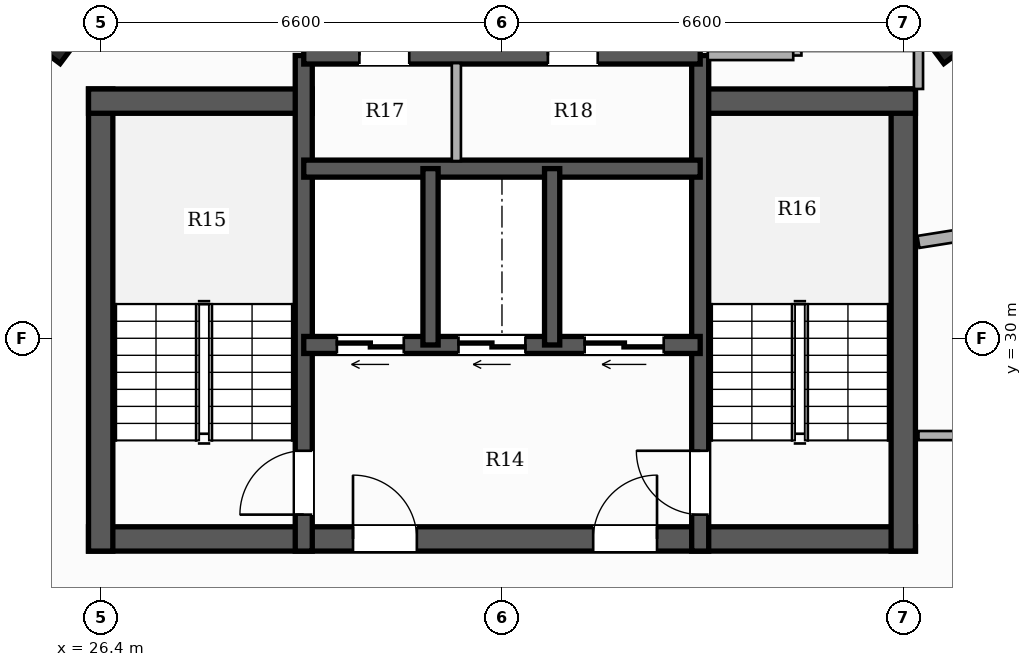
"""IFC4 building model, lengths in metres.
Left out: names, types, materials, properties, quantities, classifications, styles, units other than length and angle.
Written with IfcOpenShell. Run it as: python <this file> out.ifc"""

import sys

from ifc_helpers import new_model, si_unit, direction, frame, frame_2d, origin, origin_2d, place, context, subcontext, project, spatial, rectangle, hollow_rectangle, extrude, element, fill, save


model = new_model("IFC4")
c1 = context("Model", 3, precision=1e-05, world=origin(), true_north=direction((0.0, 1.0)))
c2 = subcontext(c1, "Body", "Model", "MODEL_VIEW")
j1 = project(units=[si_unit("LENGTHUNIT", "METRE"), si_unit("PLANEANGLEUNIT", "RADIAN")], contexts=[c1])
p1 = place(None, origin())
s1 = spatial("IfcSite", under=j1, at=p1, CompositionType="ELEMENT")
p2 = place(p1, origin())
s2 = spatial("IfcBuilding", under=s1, at=p2, CompositionType="ELEMENT")
p3 = place(p2, frame((0.0, 0.0, 116.6)))
s3 = spatial("IfcBuildingStorey", under=s2, at=p3, CompositionType="ELEMENT", Elevation=116.6)
p4 = place(p3, frame((26.2, 26.7, 0.0), z_axis=(0.0, 0.0, 1.0), x_axis=(1.0, 0.0, 0.0)))
e1 = element("IfcWall", 1, at=p4, inside=s3, PredefinedType="SHEAR", context=c2, shape_type="SweptSolid", body=[
    extrude(rectangle(XDim=13.6, YDim=0.4, at=frame_2d((6.8, 0.0))), origin(), (0.0, 0.0, 1.0), 3.3),
])
p5 = place(p4, frame((4.35, 0.0, 0.0)))
e2 = element("IfcOpeningElement", 2, at=p5, cuts=e1, PredefinedType="OPENING", context=c2, shape_type="SweptSolid", body=[
    extrude(rectangle(XDim=1.05, YDim=2.15, at=frame_2d((0.525, 1.075))), frame((0.0, 0.21, 0.0), z_axis=(0.0, -1.0, 0.0), x_axis=(1.0, 0.0, 0.0)), (0.0, 0.0, 1.0), 0.42),
])
p6 = place(p4, frame((8.3, 0.0, 0.0)))
e3 = element("IfcOpeningElement", 3, at=p6, cuts=e1, PredefinedType="OPENING", context=c2, shape_type="SweptSolid", body=[
    extrude(rectangle(XDim=1.05, YDim=2.15, at=frame_2d((0.525, 1.075))), frame((0.0, 0.21, 0.0), z_axis=(0.0, -1.0, 0.0), x_axis=(1.0, 0.0, 0.0)), (0.0, 0.0, 1.0), 0.42),
])
p7 = place(p3, frame((26.4, 26.5, 0.0), z_axis=(0.0, 0.0, 1.0), x_axis=(0.0, 1.0, 0.0)))
e4 = element("IfcWall", 4, at=p7, inside=s3, PredefinedType="SHEAR", context=c2, shape_type="SweptSolid", body=[
    extrude(rectangle(XDim=7.6, YDim=0.4, at=frame_2d((3.8, 0.0))), origin(), (0.0, 0.0, 1.0), 3.3),
])
p8 = place(p3, frame((26.2, 33.9, 0.0), z_axis=(0.0, 0.0, 1.0), x_axis=(1.0, 0.0, 0.0)))
e5 = element("IfcWall", 5, at=p8, inside=s3, PredefinedType="SHEAR", context=c2, shape_type="SweptSolid", body=[
    extrude(rectangle(XDim=3.68, YDim=0.4, at=frame_2d((1.84, 0.0))), origin(), (0.0, 0.0, 1.0), 3.3),
])
p9 = place(p3, frame((39.6, 26.5, 0.0), z_axis=(0.0, 0.0, 1.0), x_axis=(0.0, 1.0, 0.0)))
e6 = element("IfcWall", 6, at=p9, inside=s3, PredefinedType="SHEAR", context=c2, shape_type="SweptSolid", body=[
    extrude(rectangle(XDim=7.6, YDim=0.4, at=frame_2d((3.8, 0.0))), origin(), (0.0, 0.0, 1.0), 3.3),
])
p10 = place(p3, frame((36.12, 33.9, 0.0), z_axis=(0.0, 0.0, 1.0), x_axis=(1.0, 0.0, 0.0)))
e7 = element("IfcWall", 7, at=p10, inside=s3, PredefinedType="SHEAR", context=c2, shape_type="SweptSolid", body=[
    extrude(rectangle(XDim=3.68, YDim=0.4, at=frame_2d((1.84, 0.0))), origin(), (0.0, 0.0, 1.0), 3.3),
])
p11 = place(p3, frame((29.74, 26.5, 0.0), z_axis=(0.0, 0.0, 1.0), x_axis=(0.0, 1.0, 0.0)))
e8 = element("IfcWall", 8, at=p11, inside=s3, PredefinedType="SHEAR", context=c2, shape_type="SweptSolid", body=[
    extrude(rectangle(XDim=8.15, YDim=0.28, at=frame_2d((4.075, 0.0))), origin(), (0.0, 0.0, 1.0), 3.3),
])
p12 = place(p11, frame((0.6, 0.0, 0.0)))
e9 = element("IfcOpeningElement", 9, at=p12, cuts=e8, PredefinedType="OPENING", context=c2, shape_type="SweptSolid", body=[
    extrude(rectangle(XDim=1.05, YDim=2.15, at=frame_2d((0.525, 1.075))), frame((0.0, 0.15, 0.0), z_axis=(0.0, -1.0, 0.0), x_axis=(1.0, 0.0, 0.0)), (0.0, 0.0, 1.0), 0.3),
])
p13 = place(p3, frame((36.26, 26.5, 0.0), z_axis=(0.0, 0.0, 1.0), x_axis=(0.0, 1.0, 0.0)))
e10 = element("IfcWall", 10, at=p13, inside=s3, PredefinedType="SHEAR", context=c2, shape_type="SweptSolid", body=[
    extrude(rectangle(XDim=8.15, YDim=0.28, at=frame_2d((4.075, 0.0))), origin(), (0.0, 0.0, 1.0), 3.3),
])
p14 = place(p13, frame((0.6, 0.0, 0.0)))
e11 = element("IfcOpeningElement", 11, at=p14, cuts=e10, PredefinedType="OPENING", context=c2, shape_type="SweptSolid", body=[
    extrude(rectangle(XDim=1.05, YDim=2.15, at=frame_2d((0.525, 1.075))), frame((0.0, 0.15, 0.0), z_axis=(0.0, -1.0, 0.0), x_axis=(1.0, 0.0, 0.0)), (0.0, 0.0, 1.0), 0.3),
])
p15 = place(p3, frame((36.26, 29.89, 0.0), z_axis=(0.0, 0.0, 1.0), x_axis=(-1.0, 0.0, 0.0)))
e12 = element("IfcWall", 12, at=p15, inside=s3, PredefinedType="SHEAR", context=c2, shape_type="SweptSolid", body=[
    extrude(rectangle(XDim=6.52, YDim=0.28, at=frame_2d((3.26, 0.0))), origin(), (0.0, 0.0, 1.0), 3.3),
])
p16 = place(p15, frame((4.875, 0.0, 0.0)))
e13 = element("IfcOpeningElement", 13, at=p16, cuts=e12, PredefinedType="OPENING", context=c2, shape_type="SweptSolid", body=[
    extrude(rectangle(XDim=1.1, YDim=2.2, at=frame_2d((0.55, 1.1))), frame((0.0, 0.15, 0.0), z_axis=(0.0, -1.0, 0.0), x_axis=(1.0, 0.0, 0.0)), (0.0, 0.0, 1.0), 0.3),
])
p17 = place(p15, frame((2.875, 0.0, 0.0)))
e14 = element("IfcOpeningElement", 14, at=p17, cuts=e12, PredefinedType="OPENING", context=c2, shape_type="SweptSolid", body=[
    extrude(rectangle(XDim=1.1, YDim=2.2, at=frame_2d((0.55, 1.1))), frame((0.0, 0.15, 0.0), z_axis=(0.0, -1.0, 0.0), x_axis=(1.0, 0.0, 0.0)), (0.0, 0.0, 1.0), 0.3),
])
p18 = place(p15, frame((0.6, 0.0, 0.0)))
e15 = element("IfcOpeningElement", 15, at=p18, cuts=e12, PredefinedType="OPENING", context=c2, shape_type="SweptSolid", body=[
    extrude(rectangle(XDim=1.3, YDim=2.2, at=frame_2d((0.65, 1.1))), frame((0.0, 0.15, 0.0), z_axis=(0.0, -1.0, 0.0), x_axis=(1.0, 0.0, 0.0)), (0.0, 0.0, 1.0), 0.3),
])
p19 = place(p3, frame((29.74, 32.79, 0.0), z_axis=(0.0, 0.0, 1.0), x_axis=(1.0, 0.0, 0.0)))
e16 = element("IfcWall", 16, at=p19, inside=s3, PredefinedType="SHEAR", context=c2, shape_type="SweptSolid", body=[
    extrude(rectangle(XDim=6.52, YDim=0.28, at=frame_2d((3.26, 0.0))), origin(), (0.0, 0.0, 1.0), 3.3),
])
for number, where, z_axis, x_axis in (
    (17, (31.825, 29.89, 0.0), (0.0, 0.0, 1.0), (0.0, 1.0, 0.0)),
    (18, (33.825, 29.89, 0.0), (0.0, 0.0, 1.0), (0.0, 1.0, 0.0)),
):
    element("IfcWall", number, at=place(p3, frame(where, z_axis=z_axis, x_axis=x_axis)), inside=s3, PredefinedType="SHEAR", context=c2, shape_type="SweptSolid", body=[
        extrude(rectangle(XDim=2.9, YDim=0.25, at=frame_2d((1.45, 0.0))), origin(), (0.0, 0.0, 1.0), 3.3),
    ])
p20 = place(p3, frame((29.74, 34.65, 0.0), z_axis=(0.0, 0.0, 1.0), x_axis=(1.0, 0.0, 0.0)))
e19 = element("IfcWall", 19, at=p20, inside=s3, PredefinedType="SHEAR", context=c2, shape_type="SweptSolid", body=[
    extrude(rectangle(XDim=6.52, YDim=0.28, at=frame_2d((3.26, 0.0))), origin(), (0.0, 0.0, 1.0), 3.3),
])
p21 = place(p20, frame((0.915, 0.0, 0.0)))
e20 = element("IfcOpeningElement", 20, at=p21, cuts=e19, PredefinedType="OPENING", context=c2, shape_type="SweptSolid", body=[
    extrude(rectangle(XDim=0.82, YDim=2.1, at=frame_2d((0.41, 1.05))), frame((0.0, 0.15, 0.0), z_axis=(0.0, -1.0, 0.0), x_axis=(1.0, 0.0, 0.0)), (0.0, 0.0, 1.0), 0.3),
])
p22 = place(p20, frame((4.015, 0.0, 0.0)))
e21 = element("IfcOpeningElement", 21, at=p22, cuts=e19, PredefinedType="OPENING", context=c2, shape_type="SweptSolid", body=[
    extrude(rectangle(XDim=0.82, YDim=2.1, at=frame_2d((0.41, 1.05))), frame((0.0, 0.15, 0.0), z_axis=(0.0, -1.0, 0.0), x_axis=(1.0, 0.0, 0.0)), (0.0, 0.0, 1.0), 0.3),
])
for number, where, z_axis, x_axis in (
    (22, (25.648, 35.113, 0.0), (0.0, 0.0, 1.0), (0.6, 0.8, 0.0)),
    (23, (40.352, 35.113, 0.0), (0.0, 0.0, 1.0), (-0.6, 0.8, 0.0)),
):
    element("IfcColumn", number, at=place(p3, frame(where, z_axis=z_axis, x_axis=x_axis)), inside=s3, PredefinedType="COLUMN", context=c2, shape_type="SweptSolid", body=[
        extrude(hollow_rectangle(XDim=0.85, YDim=0.85, WallThickness=0.028, at=origin_2d()), origin(), (0.0, 0.0, 1.0), 3.3),
    ])
p23 = place(p3, frame((37.85, 34.65, 0.0), z_axis=(0.0, 0.0, 1.0), x_axis=(0.0, 1.0, 0.0)))
e24 = element("IfcWall", 24, at=p23, inside=s3, PredefinedType="PARTITIONING", context=c2, shape_type="SweptSolid", body=[
    extrude(rectangle(XDim=2.26, YDim=0.15, at=frame_2d((1.13, 0.0))), origin(), (0.0, 0.0, 1.0), 3.06),
])
p24 = place(p3, frame((36.385, 34.65, 0.0), z_axis=(0.0, 0.0, 1.0), x_axis=(1.0, 0.0, 0.0)))
e25 = element("IfcWall", 25, at=p24, inside=s3, PredefinedType="PARTITIONING", context=c2, shape_type="SweptSolid", body=[
    extrude(rectangle(XDim=1.405, YDim=0.15, at=frame_2d((0.703, 0.0))), origin(), (0.0, 0.0, 1.0), 2.425),
])
p25 = place(p3, frame((32.25, 32.915, 0.0), z_axis=(0.0, 0.0, 1.0), x_axis=(0.0, 1.0, 0.0)))
e26 = element("IfcWall", 26, at=p25, inside=s3, PredefinedType="PARTITIONING", context=c2, shape_type="SweptSolid", body=[
    extrude(rectangle(XDim=1.61, YDim=0.15, at=frame_2d((0.805, 0.0))), origin(), (0.0, 0.0, 1.0), 3.06),
])
p26 = place(p3, frame((39.85, 28.4, 0.0), z_axis=(0.0, 0.0, 1.0), x_axis=(1.0, 0.0, 0.0)))
e27 = element("IfcWall", 27, at=p26, inside=s3, PredefinedType="PARTITIONING", context=c2, shape_type="SweptSolid", body=[
    extrude(rectangle(XDim=2.5, YDim=0.15, at=frame_2d((1.25, 0.0))), origin(), (0.0, 0.0, 1.0), 2.721),
])
p27 = place(p3, frame((39.85, 34.74, 0.0), z_axis=(0.0, 0.0, 1.0), x_axis=(0.0, -1.0, 0.0)))
e28 = element("IfcWall", 28, at=p27, inside=s3, PredefinedType="PARTITIONING", context=c2, shape_type="SweptSolid", body=[
    extrude(rectangle(XDim=0.64, YDim=0.15, at=frame_2d((0.32, 0.0))), origin(), (0.0, 0.0, 1.0), 2.721),
])
p28 = place(p3, frame((46.976, 32.714, 0.0), z_axis=(0.0, 0.0, 1.0), x_axis=(-0.987677489662, -0.156502959767, 0.0)))
e29 = element("IfcWall", 29, at=p28, inside=s3, PredefinedType="PARTITIONING", context=c2, shape_type="SweptSolid", body=[
    extrude(rectangle(XDim=7.215, YDim=0.2, at=frame_2d((3.607, 0.0))), origin(), (0.0, 0.0, 1.0), 2.413),
])
p29 = place(p3, frame((39.203, 38.043, 0.0), z_axis=(0.0, 0.0, 1.0), x_axis=(0.704889894519, -0.709316739267, 0.0)))
e30 = element("IfcWall", 30, at=p29, inside=s3, PredefinedType="PARTITIONING", context=c2, shape_type="SweptSolid", body=[
    extrude(rectangle(XDim=7.886, YDim=0.12, at=frame_2d((3.943, 0.0))), origin(), (0.0, 0.0, 1.0), 2.413),
])
p30 = place(p29, frame((3.78, 0.0, 0.0)))
e31 = element("IfcOpeningElement", 31, at=p30, cuts=e30, PredefinedType="OPENING", context=c2, shape_type="SweptSolid", body=[
    extrude(rectangle(XDim=0.82, YDim=2.1, at=frame_2d((0.41, 1.05))), frame((0.0, 0.07, 0.0), z_axis=(0.0, -1.0, 0.0), x_axis=(1.0, 0.0, 0.0)), (0.0, 0.0, 1.0), 0.14),
])
p31 = place(p12, origin())
e32 = element("IfcDoor", 32, at=p31, inside=s3, OperationType="SINGLE_SWING_LEFT", PredefinedType="DOOR", context=c2, shape_type="SweptSolid", body=[
    extrude(rectangle(XDim=1.05, YDim=2.15, at=frame_2d((0.525, 1.075))), frame((0.0, 0.025, 0.0), z_axis=(0.0, -1.0, 0.0), x_axis=(1.0, 0.0, 0.0)), (0.0, 0.0, 1.0), 0.05),
])
fill(e9, e32)
p32 = place(p14, origin())
e33 = element("IfcDoor", 33, at=p32, inside=s3, OperationType="SINGLE_SWING_RIGHT", PredefinedType="DOOR", context=c2, shape_type="SweptSolid", body=[
    extrude(rectangle(XDim=1.05, YDim=2.15, at=frame_2d((0.525, 1.075))), frame((0.0, 0.025, 0.0), z_axis=(0.0, -1.0, 0.0), x_axis=(1.0, 0.0, 0.0)), (0.0, 0.0, 1.0), 0.05),
])
fill(e11, e33)
p33 = place(p5, origin())
e34 = element("IfcDoor", 34, at=p33, inside=s3, OperationType="SINGLE_SWING_LEFT", PredefinedType="DOOR", context=c2, shape_type="SweptSolid", body=[
    extrude(rectangle(XDim=1.05, YDim=2.15, at=frame_2d((0.525, 1.075))), frame((0.0, 0.025, 0.0), z_axis=(0.0, -1.0, 0.0), x_axis=(1.0, 0.0, 0.0)), (0.0, 0.0, 1.0), 0.05),
])
fill(e2, e34)
p34 = place(p6, origin())
e35 = element("IfcDoor", 35, at=p34, inside=s3, OperationType="SINGLE_SWING_RIGHT", PredefinedType="DOOR", context=c2, shape_type="SweptSolid", body=[
    extrude(rectangle(XDim=1.05, YDim=2.15, at=frame_2d((0.525, 1.075))), frame((0.0, 0.025, 0.0), z_axis=(0.0, -1.0, 0.0), x_axis=(1.0, 0.0, 0.0)), (0.0, 0.0, 1.0), 0.05),
])
fill(e3, e35)
p35 = place(p16, origin())
e36 = element("IfcDoor", 36, at=p35, inside=s3, OperationType="DOUBLE_DOOR_SLIDING", PredefinedType="DOOR", context=c2, shape_type="SweptSolid", body=[
    extrude(rectangle(XDim=1.1, YDim=2.2, at=frame_2d((0.55, 1.1))), frame((0.0, 0.025, 0.0), z_axis=(0.0, -1.0, 0.0), x_axis=(1.0, 0.0, 0.0)), (0.0, 0.0, 1.0), 0.05),
])
fill(e13, e36)
p36 = place(p17, origin())
e37 = element("IfcDoor", 37, at=p36, inside=s3, OperationType="DOUBLE_DOOR_SLIDING", PredefinedType="DOOR", context=c2, shape_type="SweptSolid", body=[
    extrude(rectangle(XDim=1.1, YDim=2.2, at=frame_2d((0.55, 1.1))), frame((0.0, 0.025, 0.0), z_axis=(0.0, -1.0, 0.0), x_axis=(1.0, 0.0, 0.0)), (0.0, 0.0, 1.0), 0.05),
])
fill(e14, e37)
p37 = place(p18, origin())
e38 = element("IfcDoor", 38, at=p37, inside=s3, OperationType="DOUBLE_DOOR_SLIDING", PredefinedType="DOOR", context=c2, shape_type="SweptSolid", body=[
    extrude(rectangle(XDim=1.3, YDim=2.2, at=frame_2d((0.65, 1.1))), frame((0.0, 0.025, 0.0), z_axis=(0.0, -1.0, 0.0), x_axis=(1.0, 0.0, 0.0)), (0.0, 0.0, 1.0), 0.05),
])
fill(e15, e38)
p38 = place(p21, origin())
e39 = element("IfcDoor", 39, at=p38, inside=s3, OperationType="SINGLE_SWING_LEFT", PredefinedType="DOOR", context=c2, shape_type="SweptSolid", body=[
    extrude(rectangle(XDim=0.82, YDim=2.1, at=frame_2d((0.41, 1.05))), frame((0.0, 0.025, 0.0), z_axis=(0.0, -1.0, 0.0), x_axis=(1.0, 0.0, 0.0)), (0.0, 0.0, 1.0), 0.05),
])
fill(e20, e39)
p39 = place(p22, origin())
e40 = element("IfcDoor", 40, at=p39, inside=s3, OperationType="SINGLE_SWING_LEFT", PredefinedType="DOOR", context=c2, shape_type="SweptSolid", body=[
    extrude(rectangle(XDim=0.82, YDim=2.1, at=frame_2d((0.41, 1.05))), frame((0.0, 0.025, 0.0), z_axis=(0.0, -1.0, 0.0), x_axis=(1.0, 0.0, 0.0)), (0.0, 0.0, 1.0), 0.05),
])
fill(e21, e40)
save(model, sys.argv[1])
